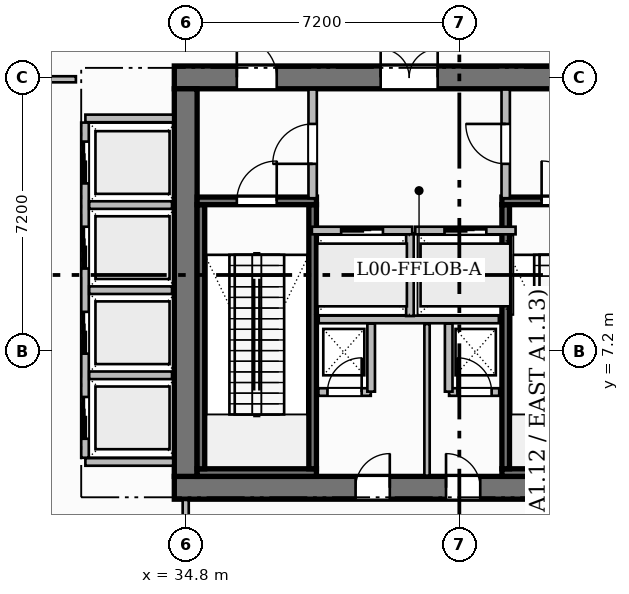
"""IFC4 building model, lengths in metres.
Left out: names, types, materials, properties, quantities, classifications, styles, units other than length and angle.
Written with IfcOpenShell. Run it as: python <this file> out.ifc"""

import sys

from ifc_helpers import new_model, si_unit, direction, frame, frame_2d, origin, place, context, subcontext, project, spatial, rectangle, extrude, source, transform, mapped, element, fill, save


model = new_model("IFC4")
c1 = context("Model", 3, precision=1e-05, world=origin(), true_north=direction((0.0, 1.0)))
c2 = subcontext(c1, "Body", "Model", "MODEL_VIEW")
j1 = project(units=[si_unit("LENGTHUNIT", "METRE"), si_unit("PLANEANGLEUNIT", "RADIAN")], contexts=[c1])
p1 = place(None, origin())
s1 = spatial("IfcSite", under=j1, at=p1, CompositionType="ELEMENT")
p2 = place(p1, origin())
s2 = spatial("IfcBuilding", under=s1, at=p2, CompositionType="ELEMENT")
p3 = place(p2, origin())
s3 = spatial("IfcBuildingStorey", under=s2, at=p3, CompositionType="ELEMENT", Elevation=0.0)
p4 = place(p3, frame((34.5, 3.6, 0.0), z_axis=(0.0, 0.0, 1.0), x_axis=(1.0, 0.0, 0.0)))
e1 = element("IfcWall", 1, at=p4, inside=s3, PredefinedType="SHEAR", context=c2, shape_type="SweptSolid", body=[
    extrude(rectangle(XDim=15.6, YDim=0.6, at=frame_2d((7.8, 0.0))), origin(), (0.0, 0.0, 1.0), 5.4),
])
p5 = place(p4, frame((4.77, 0.0, 0.0)))
e2 = element("IfcOpeningElement", 2, at=p5, cuts=e1, PredefinedType="OPENING", context=c2, shape_type="SweptSolid", body=[
    extrude(rectangle(XDim=0.9, YDim=2.1, at=frame_2d((0.45, 1.05))), frame((0.0, 0.31, 0.0), z_axis=(0.0, -1.0, 0.0), x_axis=(1.0, 0.0, 0.0)), (0.0, 0.0, 1.0), 0.62),
])
p6 = place(p4, frame((7.15, 0.0, 0.0)))
e3 = element("IfcOpeningElement", 3, at=p6, cuts=e1, PredefinedType="OPENING", context=c2, shape_type="SweptSolid", body=[
    extrude(rectangle(XDim=0.9, YDim=2.1, at=frame_2d((0.45, 1.05))), frame((0.0, 0.31, 0.0), z_axis=(0.0, -1.0, 0.0), x_axis=(1.0, 0.0, 0.0)), (0.0, 0.0, 1.0), 0.62),
])
p7 = place(p3, frame((34.5, 14.4, 0.0), z_axis=(0.0, 0.0, 1.0), x_axis=(1.0, 0.0, 0.0)))
e4 = element("IfcWall", 4, at=p7, inside=s3, PredefinedType="SHEAR", context=c2, shape_type="SweptSolid", body=[
    extrude(rectangle(XDim=15.6, YDim=0.6, at=frame_2d((7.8, 0.0))), origin(), (0.0, 0.0, 1.0), 5.4),
])
p8 = place(p7, frame((5.43, 0.0, 0.0)))
e5 = element("IfcOpeningElement", 5, at=p8, cuts=e4, PredefinedType="OPENING", context=c2, shape_type="SweptSolid", body=[
    extrude(rectangle(XDim=1.5, YDim=2.2, at=frame_2d((0.75, 1.1))), frame((0.0, 0.31, 0.0), z_axis=(0.0, -1.0, 0.0), x_axis=(1.0, 0.0, 0.0)), (0.0, 0.0, 1.0), 0.62),
])
p9 = place(p7, frame((1.645, 0.0, 0.0)))
e6 = element("IfcOpeningElement", 6, at=p9, cuts=e4, PredefinedType="OPENING", context=c2, shape_type="SweptSolid", body=[
    extrude(rectangle(XDim=1.05, YDim=2.15, at=frame_2d((0.525, 1.075))), frame((0.0, 0.31, 0.0), z_axis=(0.0, -1.0, 0.0), x_axis=(1.0, 0.0, 0.0)), (0.0, 0.0, 1.0), 0.62),
])
p10 = place(p7, frame((11.275, 0.0, 0.0)))
e7 = element("IfcOpeningElement", 7, at=p10, cuts=e4, PredefinedType="OPENING", context=c2, shape_type="SweptSolid", body=[
    extrude(rectangle(XDim=1.05, YDim=2.15, at=frame_2d((0.525, 1.075))), frame((0.0, 0.31, 0.0), z_axis=(0.0, -1.0, 0.0), x_axis=(1.0, 0.0, 0.0)), (0.0, 0.0, 1.0), 0.62),
])
p11 = place(p3, frame((34.8, 3.9, 0.0), z_axis=(0.0, 0.0, 1.0), x_axis=(0.0, 1.0, 0.0)))
e8 = element("IfcWall", 8, at=p11, inside=s3, PredefinedType="SHEAR", context=c2, shape_type="SweptSolid", body=[
    extrude(rectangle(XDim=10.2, YDim=0.6, at=frame_2d((5.1, 0.0))), origin(), (0.0, 0.0, 1.0), 5.4),
])
p12 = place(p3, frame((35.1, 4.0, 0.0), z_axis=(0.0, 0.0, 1.0), x_axis=(1.0, 0.0, 0.0)))
e9 = element("IfcWall", 9, at=p12, inside=s3, PredefinedType="SHEAR", context=c2, shape_type="SweptSolid", body=[
    extrude(rectangle(XDim=3.14, YDim=0.2, at=frame_2d((1.57, 0.0))), origin(), (0.0, 0.0, 1.0), 5.4),
])
for number, where, z_axis, x_axis in (
    (10, (35.2, 4.1, 0.0), (0.0, 0.0, 1.0), (0.0, 1.0, 0.0)),
    (11, (38.14, 4.1, 0.0), (0.0, 0.0, 1.0), (0.0, 1.0, 0.0)),
):
    element("IfcWall", number, at=place(p3, frame(where, z_axis=z_axis, x_axis=x_axis)), inside=s3, PredefinedType="SHEAR", context=c2, shape_type="SweptSolid", body=[
        extrude(rectangle(XDim=6.95, YDim=0.2, at=frame_2d((3.475, 0.0))), origin(), (0.0, 0.0, 1.0), 5.4),
    ])
p13 = place(p3, frame((35.1, 11.15, 0.0), z_axis=(0.0, 0.0, 1.0), x_axis=(1.0, 0.0, 0.0)))
e12 = element("IfcWall", 12, at=p13, inside=s3, PredefinedType="SHEAR", context=c2, shape_type="SweptSolid", body=[
    extrude(rectangle(XDim=3.14, YDim=0.2, at=frame_2d((1.57, 0.0))), origin(), (0.0, 0.0, 1.0), 5.4),
])
p14 = place(p13, frame((1.045, 0.0, 0.0)))
e13 = element("IfcOpeningElement", 13, at=p14, cuts=e12, PredefinedType="OPENING", context=c2, shape_type="SweptSolid", body=[
    extrude(rectangle(XDim=1.05, YDim=2.2, at=frame_2d((0.525, 1.1))), frame((0.0, 0.11, 0.0), z_axis=(0.0, -1.0, 0.0), x_axis=(1.0, 0.0, 0.0)), (0.0, 0.0, 1.0), 0.22),
])
p15 = place(p3, frame((43.12, 4.0, 0.0), z_axis=(0.0, 0.0, 1.0), x_axis=(1.0, 0.0, 0.0)))
e14 = element("IfcWall", 14, at=p15, inside=s3, PredefinedType="SHEAR", context=c2, shape_type="SweptSolid", body=[
    extrude(rectangle(XDim=6.38, YDim=0.2, at=frame_2d((3.19, 0.0))), origin(), (0.0, 0.0, 1.0), 5.4),
])
p16 = place(p3, frame((43.22, 4.1, 0.0), z_axis=(0.0, 0.0, 1.0), x_axis=(0.0, 1.0, 0.0)))
e15 = element("IfcWall", 15, at=p16, inside=s3, PredefinedType="SHEAR", context=c2, shape_type="SweptSolid", body=[
    extrude(rectangle(XDim=6.95, YDim=0.2, at=frame_2d((3.475, 0.0))), origin(), (0.0, 0.0, 1.0), 5.4),
])
p17 = place(p3, frame((43.12, 11.15, 0.0), z_axis=(0.0, 0.0, 1.0), x_axis=(1.0, 0.0, 0.0)))
e16 = element("IfcWall", 16, at=p17, inside=s3, PredefinedType="SHEAR", context=c2, shape_type="SweptSolid", body=[
    extrude(rectangle(XDim=6.38, YDim=0.2, at=frame_2d((3.19, 0.0))), origin(), (0.0, 0.0, 1.0), 5.4),
])
p18 = place(p17, frame((1.045, 0.0, 0.0)))
e17 = element("IfcOpeningElement", 17, at=p18, cuts=e16, PredefinedType="OPENING", context=c2, shape_type="SweptSolid", body=[
    extrude(rectangle(XDim=1.05, YDim=2.2, at=frame_2d((0.525, 1.1))), frame((0.0, 0.11, 0.0), z_axis=(0.0, -1.0, 0.0), x_axis=(1.0, 0.0, 0.0)), (0.0, 0.0, 1.0), 0.22),
])
p19 = place(p17, frame((4.125, 0.0, 0.0)))
e18 = element("IfcOpeningElement", 18, at=p19, cuts=e16, PredefinedType="OPENING", context=c2, shape_type="SweptSolid", body=[
    extrude(rectangle(XDim=1.05, YDim=2.2, at=frame_2d((0.525, 1.1))), frame((0.0, 0.11, 0.0), z_axis=(0.0, -1.0, 0.0), x_axis=(1.0, 0.0, 0.0)), (0.0, 0.0, 1.0), 0.22),
])
p20 = place(p3, frame((38.3, 8.03, 0.0), z_axis=(0.0, 0.0, 1.0), x_axis=(1.0, 0.0, 0.0)))
e19 = element("IfcWall", 19, at=p20, inside=s3, PredefinedType="PARTITIONING", context=c2, shape_type="SweptSolid", body=[
    extrude(rectangle(XDim=4.74, YDim=0.2, at=frame_2d((2.37, 0.0))), origin(), (0.0, 0.0, 1.0), 5.1),
])
p21 = place(p3, frame((40.7, 8.12, 0.0), z_axis=(0.0, 0.0, 1.0), x_axis=(0.0, 1.0, 0.0)))
e20 = element("IfcWall", 20, at=p21, inside=s3, PredefinedType="PARTITIONING", context=c2, shape_type="SweptSolid", body=[
    extrude(rectangle(XDim=2.18, YDim=0.2, at=frame_2d((1.09, 0.0))), origin(), (0.0, 0.0, 1.0), 5.1),
])
p22 = place(p3, frame((38.14, 11.22, 0.0), z_axis=(0.0, 0.0, 1.0), x_axis=(0.0, 1.0, 0.0)))
e21 = element("IfcWall", 21, at=p22, inside=s3, PredefinedType="PARTITIONING", context=c2, shape_type="SweptSolid", body=[
    extrude(rectangle(XDim=2.86, YDim=0.22, at=frame_2d((1.43, 0.0))), origin(), (0.0, 0.0, 1.0), 5.1),
])
p23 = place(p22, frame((0.905, 0.0, 0.0)))
e22 = element("IfcOpeningElement", 22, at=p23, cuts=e21, PredefinedType="OPENING", context=c2, shape_type="SweptSolid", body=[
    extrude(rectangle(XDim=1.05, YDim=2.15, at=frame_2d((0.525, 1.075))), frame((0.0, 0.12, 0.0), z_axis=(0.0, -1.0, 0.0), x_axis=(1.0, 0.0, 0.0)), (0.0, 0.0, 1.0), 0.24),
])
p24 = place(p3, frame((43.22, 11.22, 0.0), z_axis=(0.0, 0.0, 1.0), x_axis=(0.0, 1.0, 0.0)))
e23 = element("IfcWall", 23, at=p24, inside=s3, PredefinedType="PARTITIONING", context=c2, shape_type="SweptSolid", body=[
    extrude(rectangle(XDim=2.86, YDim=0.22, at=frame_2d((1.43, 0.0))), origin(), (0.0, 0.0, 1.0), 5.1),
])
p25 = place(p24, frame((0.905, 0.0, 0.0)))
e24 = element("IfcOpeningElement", 24, at=p25, cuts=e23, PredefinedType="OPENING", context=c2, shape_type="SweptSolid", body=[
    extrude(rectangle(XDim=1.05, YDim=2.15, at=frame_2d((0.525, 1.075))), frame((0.0, 0.12, 0.0), z_axis=(0.0, -1.0, 0.0), x_axis=(1.0, 0.0, 0.0)), (0.0, 0.0, 1.0), 0.24),
])
p26 = place(p3, frame((38.29, 6.12, 0.0), z_axis=(0.0, 0.0, 1.0), x_axis=(1.0, 0.0, 0.0)))
e25 = element("IfcWall", 25, at=p26, inside=s3, PredefinedType="PARTITIONING", context=c2, shape_type="SweptSolid", body=[
    extrude(rectangle(XDim=1.38, YDim=0.2, at=frame_2d((0.69, 0.0))), origin(), (0.0, 0.0, 1.0), 5.1),
])
p27 = place(p26, frame((0.24, 0.0, 0.0)))
e26 = element("IfcOpeningElement", 26, at=p27, cuts=e25, PredefinedType="OPENING", context=c2, shape_type="SweptSolid", body=[
    extrude(rectangle(XDim=0.9, YDim=2.1, at=frame_2d((0.45, 1.05))), frame((0.0, 0.11, 0.0), z_axis=(0.0, -1.0, 0.0), x_axis=(1.0, 0.0, 0.0)), (0.0, 0.0, 1.0), 0.22),
])
p28 = place(p3, frame((39.68, 6.13, 0.0), z_axis=(0.0, 0.0, 1.0), x_axis=(0.0, 1.0, 0.0)))
e27 = element("IfcWall", 27, at=p28, inside=s3, PredefinedType="PARTITIONING", context=c2, shape_type="SweptSolid", body=[
    extrude(rectangle(XDim=1.79, YDim=0.2, at=frame_2d((0.895, 0.0))), origin(), (0.0, 0.0, 1.0), 5.1),
])
p29 = place(p3, frame((41.73, 6.12, 0.0), z_axis=(0.0, 0.0, 1.0), x_axis=(1.0, 0.0, 0.0)))
e28 = element("IfcWall", 28, at=p29, inside=s3, PredefinedType="PARTITIONING", context=c2, shape_type="SweptSolid", body=[
    extrude(rectangle(XDim=1.32, YDim=0.2, at=frame_2d((0.66, 0.0))), origin(), (0.0, 0.0, 1.0), 5.1),
])
p30 = place(p29, frame((0.22, 0.0, 0.0)))
e29 = element("IfcOpeningElement", 29, at=p30, cuts=e28, PredefinedType="OPENING", context=c2, shape_type="SweptSolid", body=[
    extrude(rectangle(XDim=0.9, YDim=2.1, at=frame_2d((0.45, 1.05))), frame((0.0, 0.11, 0.0), z_axis=(0.0, -1.0, 0.0), x_axis=(1.0, 0.0, 0.0)), (0.0, 0.0, 1.0), 0.22),
])
p31 = place(p3, frame((41.72, 6.13, 0.0), z_axis=(0.0, 0.0, 1.0), x_axis=(0.0, 1.0, 0.0)))
e30 = element("IfcWall", 30, at=p31, inside=s3, PredefinedType="PARTITIONING", context=c2, shape_type="SweptSolid", body=[
    extrude(rectangle(XDim=1.79, YDim=0.2, at=frame_2d((0.895, 0.0))), origin(), (0.0, 0.0, 1.0), 5.1),
])
p32 = place(p3, frame((41.15, 3.92, 0.0), z_axis=(0.0, 0.0, 1.0), x_axis=(0.0, 1.0, 0.0)))
e31 = element("IfcWall", 31, at=p32, inside=s3, PredefinedType="PARTITIONING", context=c2, shape_type="SweptSolid", body=[
    extrude(rectangle(XDim=3.99, YDim=0.14, at=frame_2d((1.995, 0.0))), origin(), (0.0, 0.0, 1.0), 5.1),
])
for number, where, z_axis, x_axis in (
    (32, (32.16, 4.28, 0.0), (0.0, 0.0, 1.0), (1.0, 0.0, 0.0)),
    (33, (32.16, 13.32, 0.0), (0.0, 0.0, 1.0), (1.0, 0.0, 0.0)),
):
    element("IfcWall", number, at=place(p3, frame(where, z_axis=z_axis, x_axis=x_axis)), inside=s3, PredefinedType="PARTITIONING", context=c2, shape_type="SweptSolid", body=[
        extrude(rectangle(XDim=2.31, YDim=0.2, at=frame_2d((1.155, 0.0))), origin(), (0.0, 0.0, 1.0), 5.1),
    ])
p33 = place(p3, frame((32.15, 4.39, 0.0), z_axis=(0.0, 0.0, 1.0), x_axis=(0.0, 1.0, 0.0)))
e34 = element("IfcWall", 34, at=p33, inside=s3, PredefinedType="PARTITIONING", context=c2, shape_type="SweptSolid", body=[
    extrude(rectangle(XDim=8.82, YDim=0.2, at=frame_2d((4.41, 0.0))), origin(), (0.0, 0.0, 1.0), 5.1),
])
p34 = place(p33, frame((0.5, 0.0, 0.0)))
e35 = element("IfcOpeningElement", 35, at=p34, cuts=e34, PredefinedType="OPENING", context=c2, shape_type="SweptSolid", body=[
    extrude(rectangle(XDim=1.1, YDim=2.2, at=frame_2d((0.55, 1.1))), frame((0.0, 0.11, 0.0), z_axis=(0.0, -1.0, 0.0), x_axis=(1.0, 0.0, 0.0)), (0.0, 0.0, 1.0), 0.22),
])
p35 = place(p33, frame((2.74, 0.0, 0.0)))
e36 = element("IfcOpeningElement", 36, at=p35, cuts=e34, PredefinedType="OPENING", context=c2, shape_type="SweptSolid", body=[
    extrude(rectangle(XDim=1.1, YDim=2.2, at=frame_2d((0.55, 1.1))), frame((0.0, 0.11, 0.0), z_axis=(0.0, -1.0, 0.0), x_axis=(1.0, 0.0, 0.0)), (0.0, 0.0, 1.0), 0.22),
])
p36 = place(p33, frame((4.98, 0.0, 0.0)))
e37 = element("IfcOpeningElement", 37, at=p36, cuts=e34, PredefinedType="OPENING", context=c2, shape_type="SweptSolid", body=[
    extrude(rectangle(XDim=1.1, YDim=2.2, at=frame_2d((0.55, 1.1))), frame((0.0, 0.11, 0.0), z_axis=(0.0, -1.0, 0.0), x_axis=(1.0, 0.0, 0.0)), (0.0, 0.0, 1.0), 0.22),
])
p37 = place(p33, frame((7.22, 0.0, 0.0)))
e38 = element("IfcOpeningElement", 38, at=p37, cuts=e34, PredefinedType="OPENING", context=c2, shape_type="SweptSolid", body=[
    extrude(rectangle(XDim=1.1, YDim=2.2, at=frame_2d((0.55, 1.1))), frame((0.0, 0.11, 0.0), z_axis=(0.0, -1.0, 0.0), x_axis=(1.0, 0.0, 0.0)), (0.0, 0.0, 1.0), 0.22),
])
for number, where, z_axis, x_axis in (
    (39, (32.26, 6.56, 0.0), (0.0, 0.0, 1.0), (1.0, 0.0, 0.0)),
    (40, (32.26, 8.8, 0.0), (0.0, 0.0, 1.0), (1.0, 0.0, 0.0)),
    (41, (32.26, 11.04, 0.0), (0.0, 0.0, 1.0), (1.0, 0.0, 0.0)),
):
    element("IfcWall", number, at=place(p3, frame(where, z_axis=z_axis, x_axis=x_axis)), inside=s3, PredefinedType="PARTITIONING", context=c2, shape_type="SweptSolid", body=[
        extrude(rectangle(XDim=2.18, YDim=0.2, at=frame_2d((1.09, 0.0))), origin(), (0.0, 0.0, 1.0), 5.1),
    ])
p38 = place(p3, frame((34.8, 0.32, 0.0), z_axis=(0.0, 0.0, 1.0), x_axis=(0.0, 1.0, 0.0)))
e42 = element("IfcWall", 42, at=p38, inside=s3, PredefinedType="PARTITIONING", context=c2, shape_type="SweptSolid", body=[
    extrude(rectangle(XDim=2.96, YDim=0.16, at=frame_2d((1.48, 0.0))), origin(), (0.0, 0.0, 1.0), 5.1),
])
p39 = place(p38, frame((0.955, 0.0, 0.0)))
e43 = element("IfcOpeningElement", 43, at=p39, cuts=e42, PredefinedType="OPENING", context=c2, shape_type="SweptSolid", body=[
    extrude(rectangle(XDim=1.05, YDim=2.15, at=frame_2d((0.525, 1.075))), frame((0.0, 0.09, 0.0), z_axis=(0.0, -1.0, 0.0), x_axis=(1.0, 0.0, 0.0)), (0.0, 0.0, 1.0), 0.18),
])
p40 = place(p3, frame((28.64, 14.35, 0.0), z_axis=(0.0, 0.0, 1.0), x_axis=(1.0, 0.0, 0.0)))
e44 = element("IfcWall", 44, at=p40, inside=s3, PredefinedType="PARTITIONING", context=c2, shape_type="SweptSolid", body=[
    extrude(rectangle(XDim=3.27, YDim=0.16, at=frame_2d((1.635, 0.0))), origin(), (0.0, 0.0, 1.0), 4.085),
])
p41 = place(p40, frame((0.935, 0.0, 0.0)))
e45 = element("IfcOpeningElement", 45, at=p41, cuts=e44, PredefinedType="OPENING", context=c2, shape_type="SweptSolid", body=[
    extrude(rectangle(XDim=1.4, YDim=2.35, at=frame_2d((0.7, 1.175))), frame((0.0, 0.09, 0.0), z_axis=(0.0, -1.0, 0.0), x_axis=(1.0, 0.0, 0.0)), (0.0, 0.0, 1.0), 0.18),
])
p42 = place(p3, frame((38.12, 10.37, 0.0), z_axis=(0.0, 0.0, 1.0), x_axis=(1.0, 0.0, 0.0)))
e46 = element("IfcWall", 46, at=p42, inside=s3, PredefinedType="PARTITIONING", context=c2, shape_type="SweptSolid", body=[
    extrude(rectangle(XDim=2.64, YDim=0.2, at=frame_2d((1.32, 0.0))), origin(), (0.0, 0.0, 1.0), 5.1),
])
p43 = place(p42, frame((0.77, 0.0, 0.0)))
e47 = element("IfcOpeningElement", 47, at=p43, cuts=e46, PredefinedType="OPENING", context=c2, shape_type="SweptSolid", body=[
    extrude(rectangle(XDim=1.1, YDim=2.2, at=frame_2d((0.55, 1.1))), frame((0.0, 0.11, 0.0), z_axis=(0.0, -1.0, 0.0), x_axis=(1.0, 0.0, 0.0)), (0.0, 0.0, 1.0), 0.22),
])
p44 = place(p3, frame((40.84, 10.37, 0.0), z_axis=(0.0, 0.0, 1.0), x_axis=(1.0, 0.0, 0.0)))
e48 = element("IfcWall", 48, at=p44, inside=s3, PredefinedType="PARTITIONING", context=c2, shape_type="SweptSolid", body=[
    extrude(rectangle(XDim=2.64, YDim=0.2, at=frame_2d((1.32, 0.0))), origin(), (0.0, 0.0, 1.0), 5.1),
])
p45 = place(p44, frame((0.77, 0.0, 0.0)))
e49 = element("IfcOpeningElement", 49, at=p45, cuts=e48, PredefinedType="OPENING", context=c2, shape_type="SweptSolid", body=[
    extrude(rectangle(XDim=1.1, YDim=2.2, at=frame_2d((0.55, 1.1))), frame((0.0, 0.11, 0.0), z_axis=(0.0, -1.0, 0.0), x_axis=(1.0, 0.0, 0.0)), (0.0, 0.0, 1.0), 0.22),
])
m1 = source(origin(), c2, "Body", "SweptSolid", [
    extrude(rectangle(XDim=1.05, YDim=2.2, at=frame_2d((0.525, 1.1))), frame((0.0, 0.025, 0.0), z_axis=(0.0, -1.0, 0.0), x_axis=(1.0, 0.0, 0.0)), (0.0, 0.0, 1.0), 0.05),
])
p46 = place(p14, origin())
e50 = element("IfcDoor", 50, at=p46, inside=s3, OperationType="SINGLE_SWING_RIGHT", PredefinedType="DOOR", context=c2, shape_type="MappedRepresentation", body=[
    mapped(m1, transform((0.0, 0.0, 0.0), scale=1.0)),
])
fill(e13, e50)
p47 = place(p18, origin())
e51 = element("IfcDoor", 51, at=p47, inside=s3, OperationType="SINGLE_SWING_LEFT", PredefinedType="DOOR", context=c2, shape_type="MappedRepresentation", body=[
    mapped(m1, transform((0.0, 0.0, 0.0), scale=1.0)),
])
fill(e17, e51)
m2 = source(origin(), c2, "Body", "SweptSolid", [
    extrude(rectangle(XDim=1.05, YDim=2.15, at=frame_2d((0.525, 1.075))), frame((0.0, 0.025, 0.0), z_axis=(0.0, -1.0, 0.0), x_axis=(1.0, 0.0, 0.0)), (0.0, 0.0, 1.0), 0.05),
])
p48 = place(p23, origin())
e52 = element("IfcDoor", 52, at=p48, inside=s3, OperationType="SINGLE_SWING_LEFT", PredefinedType="DOOR", context=c2, shape_type="MappedRepresentation", body=[
    mapped(m2, transform((0.0, 0.0, 0.0), scale=1.0)),
])
fill(e22, e52)
p49 = place(p25, origin())
e53 = element("IfcDoor", 53, at=p49, inside=s3, OperationType="SINGLE_SWING_RIGHT", PredefinedType="DOOR", context=c2, shape_type="MappedRepresentation", body=[
    mapped(m2, transform((0.0, 0.0, 0.0), scale=1.0)),
])
fill(e24, e53)
m3 = source(origin(), c2, "Body", "SweptSolid", [
    extrude(rectangle(XDim=1.5, YDim=2.2, at=frame_2d((0.75, 1.1))), frame((0.0, 0.025, 0.0), z_axis=(0.0, -1.0, 0.0), x_axis=(1.0, 0.0, 0.0)), (0.0, 0.0, 1.0), 0.05),
])
p50 = place(p8, origin())
e54 = element("IfcDoor", 54, at=p50, inside=s3, OperationType="DOUBLE_DOOR_SINGLE_SWING", PredefinedType="DOOR", context=c2, shape_type="MappedRepresentation", body=[
    mapped(m3, transform((0.0, 0.0, 0.0), scale=1.0)),
])
fill(e5, e54)
p51 = place(p9, origin())
e55 = element("IfcDoor", 55, at=p51, inside=s3, OperationType="SINGLE_SWING_LEFT", PredefinedType="DOOR", context=c2, shape_type="MappedRepresentation", body=[
    mapped(m2, transform((0.0, 0.0, 0.0), scale=1.0)),
])
fill(e6, e55)
m4 = source(origin(), c2, "Body", "SweptSolid", [
    extrude(rectangle(XDim=0.9, YDim=2.1, at=frame_2d((0.45, 1.05))), frame((0.0, 0.025, 0.0), z_axis=(0.0, -1.0, 0.0), x_axis=(1.0, 0.0, 0.0)), (0.0, 0.0, 1.0), 0.05),
])
p52 = place(p27, origin())
e56 = element("IfcDoor", 56, at=p52, inside=s3, OperationType="SINGLE_SWING_RIGHT", PredefinedType="DOOR", context=c2, shape_type="MappedRepresentation", body=[
    mapped(m4, transform((0.0, 0.0, 0.0), scale=1.0)),
])
fill(e26, e56)
p53 = place(p30, origin())
e57 = element("IfcDoor", 57, at=p53, inside=s3, OperationType="SINGLE_SWING_LEFT", PredefinedType="DOOR", context=c2, shape_type="MappedRepresentation", body=[
    mapped(m4, transform((0.0, 0.0, 0.0), scale=1.0)),
])
fill(e29, e57)
p54 = place(p5, origin())
e58 = element("IfcDoor", 58, at=p54, inside=s3, OperationType="SINGLE_SWING_RIGHT", PredefinedType="DOOR", context=c2, shape_type="MappedRepresentation", body=[
    mapped(m4, transform((0.0, 0.0, 0.0), scale=1.0)),
])
fill(e2, e58)
p55 = place(p6, origin())
e59 = element("IfcDoor", 59, at=p55, inside=s3, OperationType="SINGLE_SWING_LEFT", PredefinedType="DOOR", context=c2, shape_type="MappedRepresentation", body=[
    mapped(m4, transform((0.0, 0.0, 0.0), scale=1.0)),
])
fill(e3, e59)
m5 = source(origin(), c2, "Body", "SweptSolid", [
    extrude(rectangle(XDim=1.1, YDim=2.2, at=frame_2d((0.55, 1.1))), frame((0.0, 0.025, 0.0), z_axis=(0.0, -1.0, 0.0), x_axis=(1.0, 0.0, 0.0)), (0.0, 0.0, 1.0), 0.05),
])
p56 = place(p43, origin())
e60 = element("IfcDoor", 60, at=p56, inside=s3, OperationType="SLIDING_TO_LEFT", PredefinedType="DOOR", context=c2, shape_type="MappedRepresentation", body=[
    mapped(m5, transform((0.0, 0.0, 0.0), scale=1.0)),
])
fill(e47, e60)
p57 = place(p45, origin())
e61 = element("IfcDoor", 61, at=p57, inside=s3, OperationType="SLIDING_TO_LEFT", PredefinedType="DOOR", context=c2, shape_type="MappedRepresentation", body=[
    mapped(m5, transform((0.0, 0.0, 0.0), scale=1.0)),
])
fill(e49, e61)
p58 = place(p34, origin())
e62 = element("IfcDoor", 62, at=p58, inside=s3, OperationType="SLIDING_TO_LEFT", PredefinedType="DOOR", context=c2, shape_type="MappedRepresentation", body=[
    mapped(m5, transform((0.0, 0.0, 0.0), scale=1.0)),
])
fill(e35, e62)
p59 = place(p35, origin())
e63 = element("IfcDoor", 63, at=p59, inside=s3, OperationType="SLIDING_TO_LEFT", PredefinedType="DOOR", context=c2, shape_type="MappedRepresentation", body=[
    mapped(m5, transform((0.0, 0.0, 0.0), scale=1.0)),
])
fill(e36, e63)
p60 = place(p36, origin())
e64 = element("IfcDoor", 64, at=p60, inside=s3, OperationType="SLIDING_TO_LEFT", PredefinedType="DOOR", context=c2, shape_type="MappedRepresentation", body=[
    mapped(m5, transform((0.0, 0.0, 0.0), scale=1.0)),
])
fill(e37, e64)
p61 = place(p37, origin())
e65 = element("IfcDoor", 65, at=p61, inside=s3, OperationType="SLIDING_TO_LEFT", PredefinedType="DOOR", context=c2, shape_type="MappedRepresentation", body=[
    mapped(m5, transform((0.0, 0.0, 0.0), scale=1.0)),
])
fill(e38, e65)
save(model, sys.argv[1])
